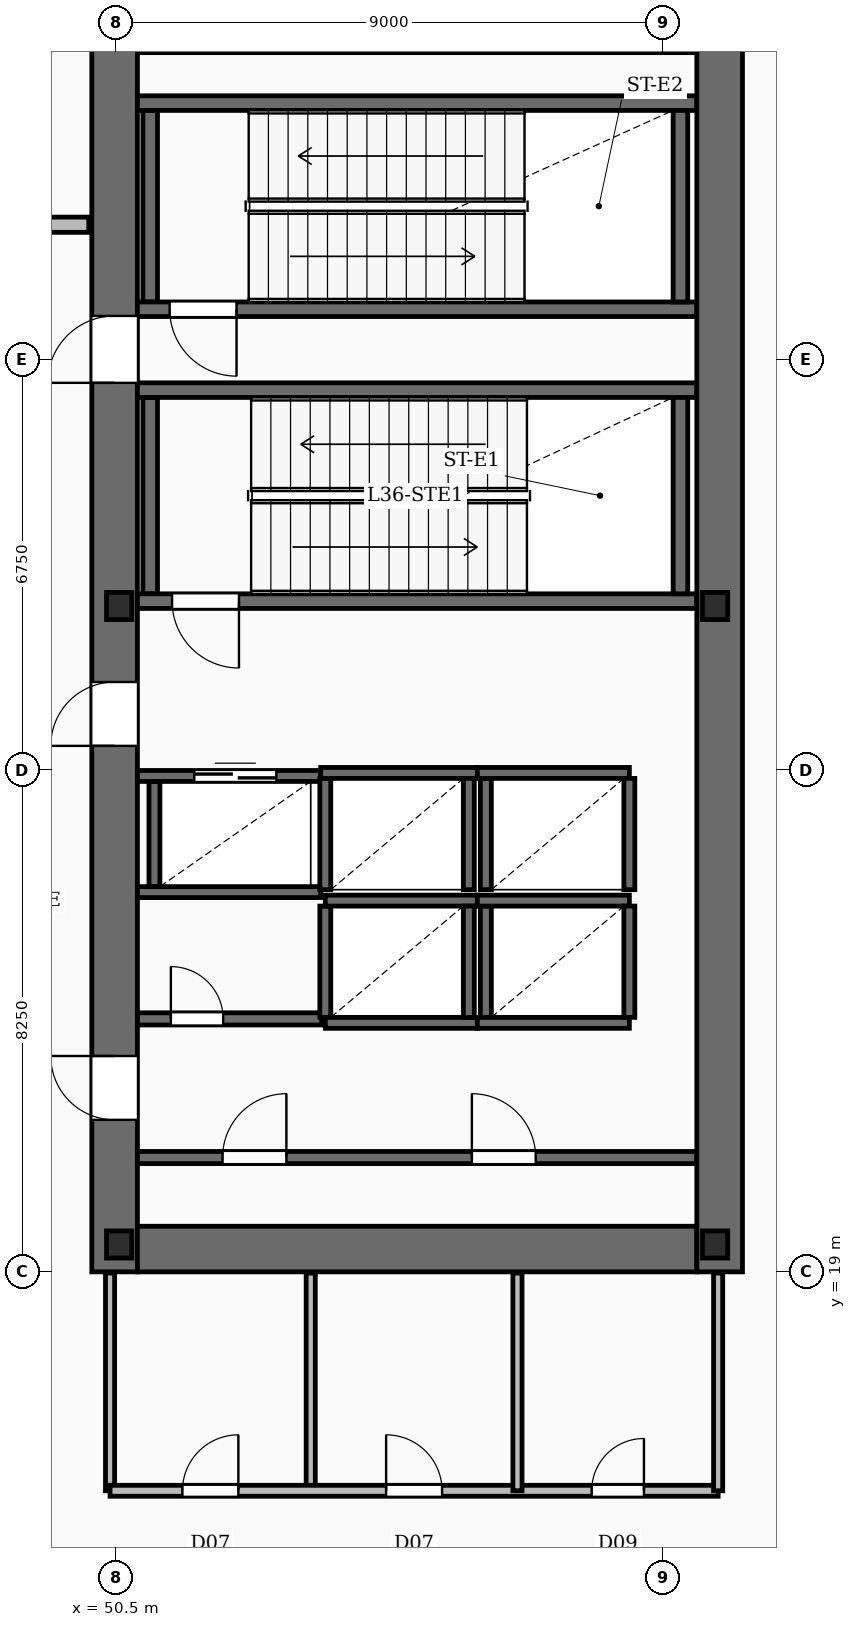
"""IFC4 building model, lengths in metres.
Left out: names, types, materials, properties, quantities, classifications, styles, units other than length and angle.
Written with IfcOpenShell. Run it as: python <this file> out.ifc"""

import sys

from ifc_helpers import new_model, si_unit, direction, frame, frame_2d, origin, origin_2d, place, context, subcontext, project, spatial, rectangle, i_section, extrude, element, fill, save


model = new_model("IFC4")
c1 = context("Model", 3, precision=1e-05, world=origin(), true_north=direction((0.0, 1.0)))
c2 = subcontext(c1, "Body", "Model", "MODEL_VIEW")
j1 = project(units=[si_unit("LENGTHUNIT", "METRE"), si_unit("PLANEANGLEUNIT", "RADIAN")], contexts=[c1])
p1 = place(None, origin())
s1 = spatial("IfcSite", under=j1, at=p1, CompositionType="ELEMENT")
p2 = place(p1, origin())
s2 = spatial("IfcBuilding", under=s1, at=p2, CompositionType="ELEMENT")
p3 = place(p2, frame((0.0, 0.0, 153.25)))
s3 = spatial("IfcBuildingStorey", under=s2, at=p3, CompositionType="ELEMENT", Elevation=153.25)
p4 = place(p3, frame((50.475, 19.0, -0.42), z_axis=(0.0, 0.0, 1.0), x_axis=(0.0, 1.0, 0.0)))
e1 = element("IfcWall", 1, at=p4, inside=s3, PredefinedType="SHEAR", context=c2, shape_type="SweptSolid", body=[
    extrude(rectangle(XDim=20.8, YDim=0.75, at=frame_2d((10.4, 0.0))), origin(), (0.0, 0.0, 1.0), 5.17),
])
p5 = place(p4, frame((2.5, 0.0, 0.42)))
e2 = element("IfcOpeningElement", 2, at=p5, cuts=e1, PredefinedType="OPENING", context=c2, shape_type="SweptSolid", body=[
    extrude(rectangle(XDim=1.05, YDim=2.15, at=frame_2d((0.525, 1.075))), frame((0.0, 0.385, 0.0), z_axis=(0.0, -1.0, 0.0), x_axis=(1.0, 0.0, 0.0)), (0.0, 0.0, 1.0), 0.77),
])
p6 = place(p4, frame((8.65, 0.0, 0.42)))
e3 = element("IfcOpeningElement", 3, at=p6, cuts=e1, PredefinedType="OPENING", context=c2, shape_type="SweptSolid", body=[
    extrude(rectangle(XDim=1.05, YDim=2.15, at=frame_2d((0.525, 1.075))), frame((0.0, 0.385, 0.0), z_axis=(0.0, -1.0, 0.0), x_axis=(1.0, 0.0, 0.0)), (0.0, 0.0, 1.0), 0.77),
])
p7 = place(p4, frame((14.62, 0.0, 0.42)))
e4 = element("IfcOpeningElement", 4, at=p7, cuts=e1, PredefinedType="OPENING", context=c2, shape_type="SweptSolid", body=[
    extrude(rectangle(XDim=1.1, YDim=2.15, at=frame_2d((0.55, 1.075))), frame((0.0, 0.385, 0.0), z_axis=(0.0, -1.0, 0.0), x_axis=(1.0, 0.0, 0.0)), (0.0, 0.0, 1.0), 0.77),
])
p8 = place(p3, frame((60.425, 19.0, -0.42), z_axis=(0.0, 0.0, 1.0), x_axis=(0.0, 1.0, 0.0)))
e5 = element("IfcWall", 5, at=p8, inside=s3, PredefinedType="SHEAR", context=c2, shape_type="SweptSolid", body=[
    extrude(rectangle(XDim=20.8, YDim=0.75, at=frame_2d((10.4, 0.0))), origin(), (0.0, 0.0, 1.0), 5.17),
])
for number, where, z_axis, x_axis in (
    (6, (50.85, 19.375, -0.42), (0.0, 0.0, 1.0), (1.0, 0.0, 0.0)),
    (7, (50.85, 39.425, -0.42), (0.0, 0.0, 1.0), (1.0, 0.0, 0.0)),
):
    element("IfcWall", number, at=place(p3, frame(where, z_axis=z_axis, x_axis=x_axis)), inside=s3, PredefinedType="SHEAR", context=c2, shape_type="SweptSolid", body=[
        extrude(rectangle(XDim=9.2, YDim=0.75, at=frame_2d((4.6, 0.0))), origin(), (0.0, 0.0, 1.0), 5.17),
    ])
for number, where, z_axis, x_axis in (
    (8, (50.55, 19.45, -0.42), (0.0, 0.0, 1.0), (1.0, 0.0, 0.0)),
    (9, (60.35, 19.45, -0.42), (0.0, 0.0, 1.0), (1.0, 0.0, 0.0)),
    (10, (50.55, 29.95, -0.42), (0.0, 0.0, 1.0), (1.0, 0.0, 0.0)),
    (11, (60.35, 29.95, -0.42), (0.0, 0.0, 1.0), (1.0, 0.0, 0.0)),
):
    element("IfcColumn", number, at=place(p3, frame(where, z_axis=z_axis, x_axis=x_axis)), inside=s3, PredefinedType="COLUMN", context=c2, shape_type="SweptSolid", body=[
        extrude(i_section(OverallWidth=0.416, OverallDepth=0.446, WebThickness=0.039, FlangeThickness=0.063, FilletRadius=0.02, at=origin_2d()), origin(), (0.0, 0.0, 1.0), 5.17),
    ])
p9 = place(p3, frame((60.05, 30.03, 0.0), z_axis=(0.0, 0.0, 1.0), x_axis=(-1.0, 0.0, 0.0)))
e12 = element("IfcWall", 12, at=p9, inside=s3, PredefinedType="SOLIDWALL", context=c2, shape_type="SweptSolid", body=[
    extrude(rectangle(XDim=9.2, YDim=0.24, at=frame_2d((4.6, 0.0))), origin(), (0.0, 0.0, 1.0), 4.75),
])
p10 = place(p9, frame((7.53, 0.0, 0.0)))
e13 = element("IfcOpeningElement", 13, at=p10, cuts=e12, PredefinedType="OPENING", context=c2, shape_type="SweptSolid", body=[
    extrude(rectangle(XDim=1.1, YDim=2.15, at=frame_2d((0.55, 1.075))), frame((0.0, 0.13, 0.0), z_axis=(0.0, -1.0, 0.0), x_axis=(1.0, 0.0, 0.0)), (0.0, 0.0, 1.0), 0.26),
])
p11 = place(p3, frame((50.85, 33.5, 0.0), z_axis=(0.0, 0.0, 1.0), x_axis=(1.0, 0.0, 0.0)))
e14 = element("IfcWall", 14, at=p11, inside=s3, PredefinedType="SOLIDWALL", context=c2, shape_type="SweptSolid", body=[
    extrude(rectangle(XDim=9.2, YDim=0.24, at=frame_2d((4.6, 0.0))), origin(), (0.0, 0.0, 1.0), 4.75),
])
for number, where, z_axis, x_axis in (
    (15, (51.06, 30.15, 0.0), (0.0, 0.0, 1.0), (0.0, 1.0, 0.0)),
    (16, (59.78, 30.15, 0.0), (0.0, 0.0, 1.0), (0.0, 1.0, 0.0)),
):
    element("IfcWall", number, at=place(p3, frame(where, z_axis=z_axis, x_axis=x_axis)), inside=s3, PredefinedType="SOLIDWALL", context=c2, shape_type="SweptSolid", body=[
        extrude(rectangle(XDim=3.23, YDim=0.24, at=frame_2d((1.615, 0.0))), origin(), (0.0, 0.0, 1.0), 4.75),
    ])
p12 = place(p3, frame((60.05, 34.83, 0.0), z_axis=(0.0, 0.0, 1.0), x_axis=(-1.0, 0.0, 0.0)))
e17 = element("IfcWall", 17, at=p12, inside=s3, PredefinedType="SOLIDWALL", context=c2, shape_type="SweptSolid", body=[
    extrude(rectangle(XDim=9.2, YDim=0.24, at=frame_2d((4.6, 0.0))), origin(), (0.0, 0.0, 1.0), 4.75),
])
p13 = place(p12, frame((7.57, 0.0, 0.0)))
e18 = element("IfcOpeningElement", 18, at=p13, cuts=e17, PredefinedType="OPENING", context=c2, shape_type="SweptSolid", body=[
    extrude(rectangle(XDim=1.1, YDim=2.15, at=frame_2d((0.55, 1.075))), frame((0.0, 0.13, 0.0), z_axis=(0.0, -1.0, 0.0), x_axis=(1.0, 0.0, 0.0)), (0.0, 0.0, 1.0), 0.26),
])
p14 = place(p3, frame((50.85, 38.22, 0.0), z_axis=(0.0, 0.0, 1.0), x_axis=(1.0, 0.0, 0.0)))
e19 = element("IfcWall", 19, at=p14, inside=s3, PredefinedType="SOLIDWALL", context=c2, shape_type="SweptSolid", body=[
    extrude(rectangle(XDim=9.2, YDim=0.24, at=frame_2d((4.6, 0.0))), origin(), (0.0, 0.0, 1.0), 4.75),
])
for number, where, z_axis, x_axis in (
    (20, (51.06, 34.95, 0.0), (0.0, 0.0, 1.0), (0.0, 1.0, 0.0)),
    (21, (59.78, 34.95, 0.0), (0.0, 0.0, 1.0), (0.0, 1.0, 0.0)),
):
    element("IfcWall", number, at=place(p3, frame(where, z_axis=z_axis, x_axis=x_axis)), inside=s3, PredefinedType="SOLIDWALL", context=c2, shape_type="SweptSolid", body=[
        extrude(rectangle(XDim=3.15, YDim=0.24, at=frame_2d((1.575, 0.0))), origin(), (0.0, 0.0, 1.0), 4.75),
    ])
for number, where, z_axis, x_axis in (
    (22, (53.94, 25.105, 0.0), (0.0, 0.0, 1.0), (1.0, 0.0, 0.0)),
    (23, (53.94, 23.095, 0.0), (0.0, 0.0, 1.0), (1.0, 0.0, 0.0)),
):
    element("IfcWall", number, at=place(p3, frame(where, z_axis=z_axis, x_axis=x_axis)), inside=s3, PredefinedType="SOLIDWALL", context=c2, shape_type="SweptSolid", body=[
        extrude(rectangle(XDim=2.5, YDim=0.18, at=frame_2d((1.25, 0.0))), origin(), (0.0, 0.0, 1.0), 4.75),
    ])
for number, where, z_axis, x_axis in (
    (24, (53.94, 23.185, 0.0), (0.0, 0.0, 1.0), (0.0, 1.0, 0.0)),
    (25, (56.3, 23.185, 0.0), (0.0, 0.0, 1.0), (0.0, 1.0, 0.0)),
):
    element("IfcWall", number, at=place(p3, frame(where, z_axis=z_axis, x_axis=x_axis)), inside=s3, PredefinedType="SOLIDWALL", context=c2, shape_type="SweptSolid", body=[
        extrude(rectangle(XDim=1.83, YDim=0.18, at=frame_2d((0.915, 0.0))), origin(), (0.0, 0.0, 1.0), 4.75),
    ])
for number, where, z_axis, x_axis in (
    (26, (56.44, 25.105, 0.0), (0.0, 0.0, 1.0), (1.0, 0.0, 0.0)),
    (27, (56.44, 23.095, 0.0), (0.0, 0.0, 1.0), (1.0, 0.0, 0.0)),
):
    element("IfcWall", number, at=place(p3, frame(where, z_axis=z_axis, x_axis=x_axis)), inside=s3, PredefinedType="SOLIDWALL", context=c2, shape_type="SweptSolid", body=[
        extrude(rectangle(XDim=2.5, YDim=0.18, at=frame_2d((1.25, 0.0))), origin(), (0.0, 0.0, 1.0), 4.75),
    ])
for number, where, z_axis, x_axis in (
    (28, (56.58, 23.185, 0.0), (0.0, 0.0, 1.0), (0.0, 1.0, 0.0)),
    (29, (58.94, 23.185, 0.0), (0.0, 0.0, 1.0), (0.0, 1.0, 0.0)),
):
    element("IfcWall", number, at=place(p3, frame(where, z_axis=z_axis, x_axis=x_axis)), inside=s3, PredefinedType="SOLIDWALL", context=c2, shape_type="SweptSolid", body=[
        extrude(rectangle(XDim=1.83, YDim=0.18, at=frame_2d((0.915, 0.0))), origin(), (0.0, 0.0, 1.0), 4.75),
    ])
p15 = place(p3, frame((53.865, 27.205, 0.0), z_axis=(0.0, 0.0, 1.0), x_axis=(1.0, 0.0, 0.0)))
e30 = element("IfcWall", 30, at=p15, inside=s3, PredefinedType="SOLIDWALL", context=c2, shape_type="SweptSolid", body=[
    extrude(rectangle(XDim=2.575, YDim=0.18, at=frame_2d((1.288, 0.0))), origin(), (0.0, 0.0, 1.0), 4.75),
])
for number, where, z_axis, x_axis in (
    (31, (53.94, 25.285, 0.0), (0.0, 0.0, 1.0), (0.0, 1.0, 0.0)),
    (32, (56.3, 25.285, 0.0), (0.0, 0.0, 1.0), (0.0, 1.0, 0.0)),
):
    element("IfcWall", number, at=place(p3, frame(where, z_axis=z_axis, x_axis=x_axis)), inside=s3, PredefinedType="SOLIDWALL", context=c2, shape_type="SweptSolid", body=[
        extrude(rectangle(XDim=1.83, YDim=0.18, at=frame_2d((0.915, 0.0))), origin(), (0.0, 0.0, 1.0), 4.75),
    ])
p16 = place(p3, frame((56.44, 27.205, 0.0), z_axis=(0.0, 0.0, 1.0), x_axis=(1.0, 0.0, 0.0)))
e33 = element("IfcWall", 33, at=p16, inside=s3, PredefinedType="SOLIDWALL", context=c2, shape_type="SweptSolid", body=[
    extrude(rectangle(XDim=2.5, YDim=0.18, at=frame_2d((1.25, 0.0))), origin(), (0.0, 0.0, 1.0), 4.75),
])
for number, where, z_axis, x_axis in (
    (34, (56.58, 25.285, 0.0), (0.0, 0.0, 1.0), (0.0, 1.0, 0.0)),
    (35, (58.94, 25.285, 0.0), (0.0, 0.0, 1.0), (0.0, 1.0, 0.0)),
):
    element("IfcWall", number, at=place(p3, frame(where, z_axis=z_axis, x_axis=x_axis)), inside=s3, PredefinedType="SOLIDWALL", context=c2, shape_type="SweptSolid", body=[
        extrude(rectangle(XDim=1.83, YDim=0.18, at=frame_2d((0.915, 0.0))), origin(), (0.0, 0.0, 1.0), 4.75),
    ])
p17 = place(p3, frame((50.85, 27.155, 0.0), z_axis=(0.0, 0.0, 1.0), x_axis=(1.0, 0.0, 0.0)))
e36 = element("IfcWall", 36, at=p17, inside=s3, PredefinedType="SOLIDWALL", context=c2, shape_type="SweptSolid", body=[
    extrude(rectangle(XDim=3.015, YDim=0.18, at=frame_2d((1.507, 0.0))), origin(), (0.0, 0.0, 1.0), 4.75),
])
p18 = place(p17, frame((0.935, 0.0, 0.0)))
e37 = element("IfcOpeningElement", 37, at=p18, cuts=e36, PredefinedType="OPENING", context=c2, shape_type="SweptSolid", body=[
    extrude(rectangle(XDim=1.35, YDim=2.3, at=frame_2d((0.675, 1.15))), frame((0.0, 0.1, 0.0), z_axis=(0.0, -1.0, 0.0), x_axis=(1.0, 0.0, 0.0)), (0.0, 0.0, 1.0), 0.2),
])
p19 = place(p3, frame((50.85, 25.245, 0.0), z_axis=(0.0, 0.0, 1.0), x_axis=(1.0, 0.0, 0.0)))
e38 = element("IfcWall", 38, at=p19, inside=s3, PredefinedType="SOLIDWALL", context=c2, shape_type="SweptSolid", body=[
    extrude(rectangle(XDim=3.015, YDim=0.18, at=frame_2d((1.507, 0.0))), origin(), (0.0, 0.0, 1.0), 4.75),
])
p20 = place(p3, frame((51.13, 25.335, 0.0), z_axis=(0.0, 0.0, 1.0), x_axis=(0.0, 1.0, 0.0)))
e39 = element("IfcWall", 39, at=p20, inside=s3, PredefinedType="SOLIDWALL", context=c2, shape_type="SweptSolid", body=[
    extrude(rectangle(XDim=1.73, YDim=0.18, at=frame_2d((0.865, 0.0))), origin(), (0.0, 0.0, 1.0), 4.75),
])
p21 = place(p3, frame((50.85, 20.88, 0.0), z_axis=(0.0, 0.0, 1.0), x_axis=(1.0, 0.0, 0.0)))
e40 = element("IfcWall", 40, at=p21, inside=s3, PredefinedType="SOLIDWALL", context=c2, shape_type="SweptSolid", body=[
    extrude(rectangle(XDim=9.2, YDim=0.2, at=frame_2d((4.6, 0.0))), origin(), (0.0, 0.0, 1.0), 3.81),
])
p22 = place(p21, frame((1.4, 0.0, 0.0)))
e41 = element("IfcOpeningElement", 41, at=p22, cuts=e40, PredefinedType="OPENING", context=c2, shape_type="SweptSolid", body=[
    extrude(rectangle(XDim=1.05, YDim=2.15, at=frame_2d((0.525, 1.075))), frame((0.0, 0.11, 0.0), z_axis=(0.0, -1.0, 0.0), x_axis=(1.0, 0.0, 0.0)), (0.0, 0.0, 1.0), 0.22),
])
p23 = place(p21, frame((5.5, 0.0, 0.0)))
e42 = element("IfcOpeningElement", 42, at=p23, cuts=e40, PredefinedType="OPENING", context=c2, shape_type="SweptSolid", body=[
    extrude(rectangle(XDim=1.05, YDim=2.15, at=frame_2d((0.525, 1.075))), frame((0.0, 0.11, 0.0), z_axis=(0.0, -1.0, 0.0), x_axis=(1.0, 0.0, 0.0)), (0.0, 0.0, 1.0), 0.22),
])
p24 = place(p3, frame((50.85, 23.16, 0.0), z_axis=(0.0, 0.0, 1.0), x_axis=(1.0, 0.0, 0.0)))
e43 = element("IfcWall", 43, at=p24, inside=s3, PredefinedType="SOLIDWALL", context=c2, shape_type="SweptSolid", body=[
    extrude(rectangle(XDim=3.03, YDim=0.2, at=frame_2d((1.515, 0.0))), origin(), (0.0, 0.0, 1.0), 3.81),
])
p25 = place(p24, frame((0.55, 0.0, 0.0)))
e44 = element("IfcOpeningElement", 44, at=p25, cuts=e43, PredefinedType="OPENING", context=c2, shape_type="SweptSolid", body=[
    extrude(rectangle(XDim=0.86, YDim=2.05, at=frame_2d((0.43, 1.025))), frame((0.0, 0.11, 0.0), z_axis=(0.0, -1.0, 0.0), x_axis=(1.0, 0.0, 0.0)), (0.0, 0.0, 1.0), 0.22),
])
for number, where, z_axis, x_axis in (
    (45, (53.7, 15.4, 0.0), (0.0, 0.0, 1.0), (0.0, 1.0, 0.0)),
    (46, (57.1, 15.4, 0.0), (0.0, 0.0, 1.0), (0.0, 1.0, 0.0)),
):
    element("IfcWall", number, at=place(p3, frame(where, z_axis=z_axis, x_axis=x_axis)), inside=s3, PredefinedType="PARTITIONING", context=c2, shape_type="SweptSolid", body=[
        extrude(rectangle(XDim=3.58, YDim=0.15, at=frame_2d((1.79, 0.0))), origin(), (0.0, 0.0, 1.0), 3.81),
    ])
p26 = place(p3, frame((50.4, 15.4, 0.0), z_axis=(0.0, 0.0, 1.0), x_axis=(1.0, 0.0, 0.0)))
e47 = element("IfcWall", 47, at=p26, inside=s3, PredefinedType="SOLIDWALL", context=c2, shape_type="SweptSolid", body=[
    extrude(rectangle(XDim=10.0, YDim=0.18, at=frame_2d((5.0, 0.0))), origin(), (0.0, 0.0, 1.0), 3.81),
])
p27 = place(p26, frame((1.19, 0.0, 0.0)))
e48 = element("IfcOpeningElement", 48, at=p27, cuts=e47, PredefinedType="OPENING", context=c2, shape_type="SweptSolid", body=[
    extrude(rectangle(XDim=0.92, YDim=2.1, at=frame_2d((0.46, 1.05))), frame((0.0, 0.1, 0.0), z_axis=(0.0, -1.0, 0.0), x_axis=(1.0, 0.0, 0.0)), (0.0, 0.0, 1.0), 0.2),
])
p28 = place(p26, frame((4.54, 0.0, 0.0)))
e49 = element("IfcOpeningElement", 49, at=p28, cuts=e47, PredefinedType="OPENING", context=c2, shape_type="SweptSolid", body=[
    extrude(rectangle(XDim=0.92, YDim=2.1, at=frame_2d((0.46, 1.05))), frame((0.0, 0.1, 0.0), z_axis=(0.0, -1.0, 0.0), x_axis=(1.0, 0.0, 0.0)), (0.0, 0.0, 1.0), 0.2),
])
p29 = place(p26, frame((7.92, 0.0, 0.0)))
e50 = element("IfcOpeningElement", 50, at=p29, cuts=e47, PredefinedType="OPENING", context=c2, shape_type="SweptSolid", body=[
    extrude(rectangle(XDim=0.86, YDim=2.05, at=frame_2d((0.43, 1.025))), frame((0.0, 0.1, 0.0), z_axis=(0.0, -1.0, 0.0), x_axis=(1.0, 0.0, 0.0)), (0.0, 0.0, 1.0), 0.2),
])
for number, where, z_axis, x_axis in (
    (51, (50.4, 15.4, 0.0), (0.0, 0.0, 1.0), (0.0, 1.0, 0.0)),
    (52, (60.4, 15.4, 0.0), (0.0, 0.0, 1.0), (0.0, 1.0, 0.0)),
):
    element("IfcWall", number, at=place(p3, frame(where, z_axis=z_axis, x_axis=x_axis)), inside=s3, PredefinedType="PARTITIONING", context=c2, shape_type="SweptSolid", body=[
        extrude(rectangle(XDim=3.58, YDim=0.15, at=frame_2d((1.79, 0.0))), origin(), (0.0, 0.0, 1.0), 2.8),
    ])
p30 = place(p3, frame((24.85, 36.22, 0.0), z_axis=(0.0, 0.0, 1.0), x_axis=(1.0, 0.0, 0.0)))
e53 = element("IfcWall", 53, at=p30, inside=s3, PredefinedType="SOLIDWALL", context=c2, shape_type="SweptSolid", body=[
    extrude(rectangle(XDim=25.2, YDim=0.25, at=frame_2d((12.6, 0.0))), origin(), (0.0, 0.0, 1.0), 3.81),
])
p31 = place(p30, frame((0.55, 0.0, 0.0)))
e54 = element("IfcOpeningElement", 54, at=p31, cuts=e53, PredefinedType="OPENING", context=c2, shape_type="SweptSolid", body=[
    extrude(rectangle(XDim=1.2, YDim=2.2, at=frame_2d((0.6, 1.1))), frame((0.0, 0.135, 0.0), z_axis=(0.0, -1.0, 0.0), x_axis=(1.0, 0.0, 0.0)), (0.0, 0.0, 1.0), 0.27),
])
p32 = place(p5, origin())
e55 = element("IfcDoor", 55, at=p32, inside=s3, OperationType="SINGLE_SWING_RIGHT", PredefinedType="DOOR", context=c2, shape_type="SweptSolid", body=[
    extrude(rectangle(XDim=1.05, YDim=2.15, at=frame_2d((0.525, 1.075))), frame((0.0, 0.025, 0.0), z_axis=(0.0, -1.0, 0.0), x_axis=(1.0, 0.0, 0.0)), (0.0, 0.0, 1.0), 0.05),
])
fill(e2, e55)
p33 = place(p6, origin())
e56 = element("IfcDoor", 56, at=p33, inside=s3, OperationType="SINGLE_SWING_LEFT", PredefinedType="DOOR", context=c2, shape_type="SweptSolid", body=[
    extrude(rectangle(XDim=1.05, YDim=2.15, at=frame_2d((0.525, 1.075))), frame((0.0, 0.025, 0.0), z_axis=(0.0, -1.0, 0.0), x_axis=(1.0, 0.0, 0.0)), (0.0, 0.0, 1.0), 0.05),
])
fill(e3, e56)
p34 = place(p7, origin())
e57 = element("IfcDoor", 57, at=p34, inside=s3, OperationType="SINGLE_SWING_LEFT", PredefinedType="DOOR", context=c2, shape_type="SweptSolid", body=[
    extrude(rectangle(XDim=1.1, YDim=2.15, at=frame_2d((0.55, 1.075))), frame((0.0, 0.025, 0.0), z_axis=(0.0, -1.0, 0.0), x_axis=(1.0, 0.0, 0.0)), (0.0, 0.0, 1.0), 0.05),
])
fill(e4, e57)
p35 = place(p10, origin())
e58 = element("IfcDoor", 58, at=p35, inside=s3, OperationType="SINGLE_SWING_LEFT", PredefinedType="DOOR", context=c2, shape_type="SweptSolid", body=[
    extrude(rectangle(XDim=1.1, YDim=2.15, at=frame_2d((0.55, 1.075))), frame((0.0, 0.025, 0.0), z_axis=(0.0, -1.0, 0.0), x_axis=(1.0, 0.0, 0.0)), (0.0, 0.0, 1.0), 0.05),
])
fill(e13, e58)
p36 = place(p13, origin())
e59 = element("IfcDoor", 59, at=p36, inside=s3, OperationType="SINGLE_SWING_LEFT", PredefinedType="DOOR", context=c2, shape_type="SweptSolid", body=[
    extrude(rectangle(XDim=1.1, YDim=2.15, at=frame_2d((0.55, 1.075))), frame((0.0, 0.025, 0.0), z_axis=(0.0, -1.0, 0.0), x_axis=(1.0, 0.0, 0.0)), (0.0, 0.0, 1.0), 0.05),
])
fill(e18, e59)
p37 = place(p18, origin())
e60 = element("IfcDoor", 60, at=p37, inside=s3, OperationType="DOUBLE_DOOR_SLIDING", PredefinedType="DOOR", context=c2, shape_type="SweptSolid", body=[
    extrude(rectangle(XDim=1.35, YDim=2.3, at=frame_2d((0.675, 1.15))), frame((0.0, 0.025, 0.0), z_axis=(0.0, -1.0, 0.0), x_axis=(1.0, 0.0, 0.0)), (0.0, 0.0, 1.0), 0.05),
])
fill(e37, e60)
p38 = place(p22, origin())
e61 = element("IfcDoor", 61, at=p38, inside=s3, OperationType="SINGLE_SWING_RIGHT", PredefinedType="DOOR", context=c2, shape_type="SweptSolid", body=[
    extrude(rectangle(XDim=1.05, YDim=2.15, at=frame_2d((0.525, 1.075))), frame((0.0, 0.025, 0.0), z_axis=(0.0, -1.0, 0.0), x_axis=(1.0, 0.0, 0.0)), (0.0, 0.0, 1.0), 0.05),
])
fill(e41, e61)
p39 = place(p23, origin())
e62 = element("IfcDoor", 62, at=p39, inside=s3, OperationType="SINGLE_SWING_LEFT", PredefinedType="DOOR", context=c2, shape_type="SweptSolid", body=[
    extrude(rectangle(XDim=1.05, YDim=2.15, at=frame_2d((0.525, 1.075))), frame((0.0, 0.025, 0.0), z_axis=(0.0, -1.0, 0.0), x_axis=(1.0, 0.0, 0.0)), (0.0, 0.0, 1.0), 0.05),
])
fill(e42, e62)
p40 = place(p25, origin())
e63 = element("IfcDoor", 63, at=p40, inside=s3, OperationType="SINGLE_SWING_LEFT", PredefinedType="DOOR", context=c2, shape_type="SweptSolid", body=[
    extrude(rectangle(XDim=0.86, YDim=2.05, at=frame_2d((0.43, 1.025))), frame((0.0, 0.025, 0.0), z_axis=(0.0, -1.0, 0.0), x_axis=(1.0, 0.0, 0.0)), (0.0, 0.0, 1.0), 0.05),
])
fill(e44, e63)
p41 = place(p27, origin())
e64 = element("IfcDoor", 64, at=p41, inside=s3, OperationType="SINGLE_SWING_RIGHT", PredefinedType="DOOR", context=c2, shape_type="SweptSolid", body=[
    extrude(rectangle(XDim=0.92, YDim=2.1, at=frame_2d((0.46, 1.05))), frame((0.0, 0.025, 0.0), z_axis=(0.0, -1.0, 0.0), x_axis=(1.0, 0.0, 0.0)), (0.0, 0.0, 1.0), 0.05),
])
fill(e48, e64)
p42 = place(p28, origin())
e65 = element("IfcDoor", 65, at=p42, inside=s3, OperationType="SINGLE_SWING_LEFT", PredefinedType="DOOR", context=c2, shape_type="SweptSolid", body=[
    extrude(rectangle(XDim=0.92, YDim=2.1, at=frame_2d((0.46, 1.05))), frame((0.0, 0.025, 0.0), z_axis=(0.0, -1.0, 0.0), x_axis=(1.0, 0.0, 0.0)), (0.0, 0.0, 1.0), 0.05),
])
fill(e49, e65)
p43 = place(p29, origin())
e66 = element("IfcDoor", 66, at=p43, inside=s3, OperationType="SINGLE_SWING_RIGHT", PredefinedType="DOOR", context=c2, shape_type="SweptSolid", body=[
    extrude(rectangle(XDim=0.86, YDim=2.05, at=frame_2d((0.43, 1.025))), frame((0.0, 0.025, 0.0), z_axis=(0.0, -1.0, 0.0), x_axis=(1.0, 0.0, 0.0)), (0.0, 0.0, 1.0), 0.05),
])
fill(e50, e66)
save(model, sys.argv[1])
